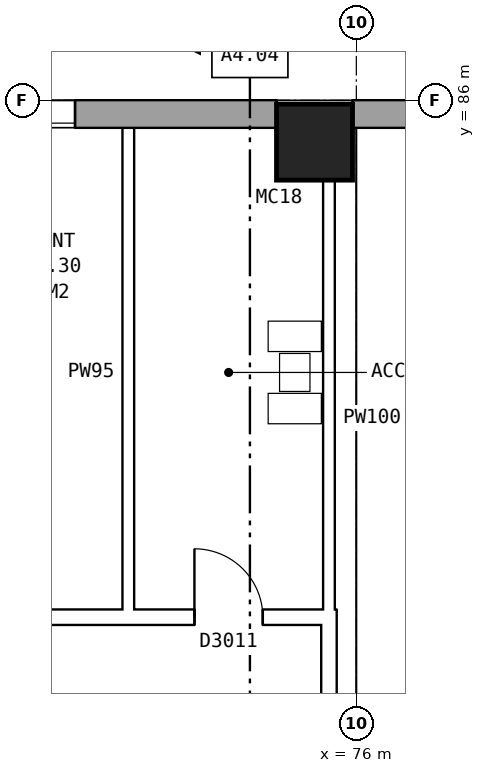
"""IFC4 building model, lengths in metres.
Left out: names, types, materials, properties, quantities, classifications, styles, units other than length and angle.
Written with IfcOpenShell. Run it as: python <this file> out.ifc"""

import sys

from ifc_helpers import new_model, si_unit, direction, frame, frame_2d, origin, origin_2d, place, context, subcontext, project, spatial, rectangle, hollow_rectangle, extrude, element, fill, save


model = new_model("IFC4")
c1 = context("Model", 3, precision=1e-05, world=origin(), true_north=direction((0.0, 1.0)))
c2 = subcontext(c1, "Body", "Model", "MODEL_VIEW")
j1 = project(units=[si_unit("LENGTHUNIT", "METRE"), si_unit("PLANEANGLEUNIT", "RADIAN")], contexts=[c1])
p1 = place(None, origin())
s1 = spatial("IfcSite", under=j1, at=p1, CompositionType="ELEMENT")
p2 = place(p1, origin())
s2 = spatial("IfcBuilding", under=s1, at=p2, CompositionType="ELEMENT")
p3 = place(p2, frame((0.0, 0.0, 215.2)))
s3 = spatial("IfcBuildingStorey", under=s2, at=p3, CompositionType="ELEMENT", Elevation=215.2)
p4 = place(p3, frame((75.45, 85.45, 0.0), z_axis=(0.0, 0.0, 1.0), x_axis=(1.0, 0.0, 0.0)))
e1 = element("IfcColumn", 1, at=p4, inside=s3, PredefinedType="COLUMN", context=c2, shape_type="SweptSolid", body=[
    extrude(hollow_rectangle(XDim=1.0, YDim=1.0, WallThickness=0.055, at=origin_2d()), origin(), (0.0, 0.0, 1.0), 6.2),
])
p5 = place(p3, frame((131.05, 85.82, 0.0), z_axis=(0.0, 0.0, 1.0), x_axis=(-1.0, 0.0, 0.0)))
e2 = element("IfcWall", 2, at=p5, inside=s3, PredefinedType="STANDARD", context=c2, shape_type="SweptSolid", body=[
    extrude(rectangle(XDim=55.1, YDim=0.36, at=frame_2d((27.55, 0.0))), origin(), (0.0, 0.0, 1.0), 5.6),
])
p6 = place(p5, frame((0.969, 0.0, 0.15)))
e3 = element("IfcOpeningElement", 3, at=p6, cuts=e2, PredefinedType="OPENING", context=c2, shape_type="SweptSolid", body=[
    extrude(rectangle(XDim=1.6, YDim=2.4, at=frame_2d((0.8, 1.2))), frame((0.0, 0.19, 0.0), z_axis=(0.0, -1.0, 0.0), x_axis=(1.0, 0.0, 0.0)), (0.0, 0.0, 1.0), 0.38),
])
p7 = place(p5, frame((4.406, 0.0, 0.15)))
e4 = element("IfcOpeningElement", 4, at=p7, cuts=e2, PredefinedType="OPENING", context=c2, shape_type="SweptSolid", body=[
    extrude(rectangle(XDim=1.6, YDim=2.4, at=frame_2d((0.8, 1.2))), frame((0.0, 0.19, 0.0), z_axis=(0.0, -1.0, 0.0), x_axis=(1.0, 0.0, 0.0)), (0.0, 0.0, 1.0), 0.38),
])
p8 = place(p5, frame((7.844, 0.0, 0.15)))
e5 = element("IfcOpeningElement", 5, at=p8, cuts=e2, PredefinedType="OPENING", context=c2, shape_type="SweptSolid", body=[
    extrude(rectangle(XDim=1.6, YDim=2.4, at=frame_2d((0.8, 1.2))), frame((0.0, 0.19, 0.0), z_axis=(0.0, -1.0, 0.0), x_axis=(1.0, 0.0, 0.0)), (0.0, 0.0, 1.0), 0.38),
])
p9 = place(p5, frame((11.281, 0.0, 0.15)))
e6 = element("IfcOpeningElement", 6, at=p9, cuts=e2, PredefinedType="OPENING", context=c2, shape_type="SweptSolid", body=[
    extrude(rectangle(XDim=1.6, YDim=2.4, at=frame_2d((0.8, 1.2))), frame((0.0, 0.19, 0.0), z_axis=(0.0, -1.0, 0.0), x_axis=(1.0, 0.0, 0.0)), (0.0, 0.0, 1.0), 0.38),
])
p10 = place(p5, frame((14.719, 0.0, 0.15)))
e7 = element("IfcOpeningElement", 7, at=p10, cuts=e2, PredefinedType="OPENING", context=c2, shape_type="SweptSolid", body=[
    extrude(rectangle(XDim=1.6, YDim=2.4, at=frame_2d((0.8, 1.2))), frame((0.0, 0.19, 0.0), z_axis=(0.0, -1.0, 0.0), x_axis=(1.0, 0.0, 0.0)), (0.0, 0.0, 1.0), 0.38),
])
p11 = place(p5, frame((18.156, 0.0, 0.15)))
e8 = element("IfcOpeningElement", 8, at=p11, cuts=e2, PredefinedType="OPENING", context=c2, shape_type="SweptSolid", body=[
    extrude(rectangle(XDim=1.6, YDim=2.4, at=frame_2d((0.8, 1.2))), frame((0.0, 0.19, 0.0), z_axis=(0.0, -1.0, 0.0), x_axis=(1.0, 0.0, 0.0)), (0.0, 0.0, 1.0), 0.38),
])
p12 = place(p5, frame((21.594, 0.0, 0.15)))
e9 = element("IfcOpeningElement", 9, at=p12, cuts=e2, PredefinedType="OPENING", context=c2, shape_type="SweptSolid", body=[
    extrude(rectangle(XDim=1.6, YDim=2.4, at=frame_2d((0.8, 1.2))), frame((0.0, 0.19, 0.0), z_axis=(0.0, -1.0, 0.0), x_axis=(1.0, 0.0, 0.0)), (0.0, 0.0, 1.0), 0.38),
])
p13 = place(p5, frame((25.031, 0.0, 0.15)))
e10 = element("IfcOpeningElement", 10, at=p13, cuts=e2, PredefinedType="OPENING", context=c2, shape_type="SweptSolid", body=[
    extrude(rectangle(XDim=1.6, YDim=2.4, at=frame_2d((0.8, 1.2))), frame((0.0, 0.19, 0.0), z_axis=(0.0, -1.0, 0.0), x_axis=(1.0, 0.0, 0.0)), (0.0, 0.0, 1.0), 0.38),
])
p14 = place(p5, frame((28.469, 0.0, 0.15)))
e11 = element("IfcOpeningElement", 11, at=p14, cuts=e2, PredefinedType="OPENING", context=c2, shape_type="SweptSolid", body=[
    extrude(rectangle(XDim=1.6, YDim=2.4, at=frame_2d((0.8, 1.2))), frame((0.0, 0.19, 0.0), z_axis=(0.0, -1.0, 0.0), x_axis=(1.0, 0.0, 0.0)), (0.0, 0.0, 1.0), 0.38),
])
p15 = place(p5, frame((31.906, 0.0, 0.15)))
e12 = element("IfcOpeningElement", 12, at=p15, cuts=e2, PredefinedType="OPENING", context=c2, shape_type="SweptSolid", body=[
    extrude(rectangle(XDim=1.6, YDim=2.4, at=frame_2d((0.8, 1.2))), frame((0.0, 0.19, 0.0), z_axis=(0.0, -1.0, 0.0), x_axis=(1.0, 0.0, 0.0)), (0.0, 0.0, 1.0), 0.38),
])
p16 = place(p5, frame((35.344, 0.0, 0.15)))
e13 = element("IfcOpeningElement", 13, at=p16, cuts=e2, PredefinedType="OPENING", context=c2, shape_type="SweptSolid", body=[
    extrude(rectangle(XDim=1.6, YDim=2.4, at=frame_2d((0.8, 1.2))), frame((0.0, 0.19, 0.0), z_axis=(0.0, -1.0, 0.0), x_axis=(1.0, 0.0, 0.0)), (0.0, 0.0, 1.0), 0.38),
])
p17 = place(p5, frame((38.781, 0.0, 0.15)))
e14 = element("IfcOpeningElement", 14, at=p17, cuts=e2, PredefinedType="OPENING", context=c2, shape_type="SweptSolid", body=[
    extrude(rectangle(XDim=1.6, YDim=2.4, at=frame_2d((0.8, 1.2))), frame((0.0, 0.19, 0.0), z_axis=(0.0, -1.0, 0.0), x_axis=(1.0, 0.0, 0.0)), (0.0, 0.0, 1.0), 0.38),
])
p18 = place(p5, frame((42.219, 0.0, 0.15)))
e15 = element("IfcOpeningElement", 15, at=p18, cuts=e2, PredefinedType="OPENING", context=c2, shape_type="SweptSolid", body=[
    extrude(rectangle(XDim=1.6, YDim=2.4, at=frame_2d((0.8, 1.2))), frame((0.0, 0.19, 0.0), z_axis=(0.0, -1.0, 0.0), x_axis=(1.0, 0.0, 0.0)), (0.0, 0.0, 1.0), 0.38),
])
p19 = place(p5, frame((45.656, 0.0, 0.15)))
e16 = element("IfcOpeningElement", 16, at=p19, cuts=e2, PredefinedType="OPENING", context=c2, shape_type="SweptSolid", body=[
    extrude(rectangle(XDim=1.6, YDim=2.4, at=frame_2d((0.8, 1.2))), frame((0.0, 0.19, 0.0), z_axis=(0.0, -1.0, 0.0), x_axis=(1.0, 0.0, 0.0)), (0.0, 0.0, 1.0), 0.38),
])
p20 = place(p5, frame((49.094, 0.0, 0.15)))
e17 = element("IfcOpeningElement", 17, at=p20, cuts=e2, PredefinedType="OPENING", context=c2, shape_type="SweptSolid", body=[
    extrude(rectangle(XDim=1.6, YDim=2.4, at=frame_2d((0.8, 1.2))), frame((0.0, 0.19, 0.0), z_axis=(0.0, -1.0, 0.0), x_axis=(1.0, 0.0, 0.0)), (0.0, 0.0, 1.0), 0.38),
])
p21 = place(p5, frame((52.531, 0.0, 0.15)))
e18 = element("IfcOpeningElement", 18, at=p21, cuts=e2, PredefinedType="OPENING", context=c2, shape_type="SweptSolid", body=[
    extrude(rectangle(XDim=1.6, YDim=2.4, at=frame_2d((0.8, 1.2))), frame((0.0, 0.19, 0.0), z_axis=(0.0, -1.0, 0.0), x_axis=(1.0, 0.0, 0.0)), (0.0, 0.0, 1.0), 0.38),
])
p22 = place(p3, frame((74.95, 85.82, 0.0), z_axis=(0.0, 0.0, 1.0), x_axis=(-1.0, 0.0, 0.0)))
e19 = element("IfcWall", 19, at=p22, inside=s3, PredefinedType="STANDARD", context=c2, shape_type="SweptSolid", body=[
    extrude(rectangle(XDim=39.875, YDim=0.36, at=frame_2d((19.938, 0.0))), origin(), (0.0, 0.0, 1.0), 5.6),
])
p23 = place(p22, frame((2.65, 0.0, 0.15)))
e20 = element("IfcOpeningElement", 20, at=p23, cuts=e19, PredefinedType="OPENING", context=c2, shape_type="SweptSolid", body=[
    extrude(rectangle(XDim=1.6, YDim=2.4, at=frame_2d((0.8, 1.2))), frame((0.0, 0.19, 0.0), z_axis=(0.0, -1.0, 0.0), x_axis=(1.0, 0.0, 0.0)), (0.0, 0.0, 1.0), 0.38),
])
p24 = place(p22, frame((5.125, 0.0, 0.15)))
e21 = element("IfcOpeningElement", 21, at=p24, cuts=e19, PredefinedType="OPENING", context=c2, shape_type="SweptSolid", body=[
    extrude(rectangle(XDim=1.6, YDim=2.4, at=frame_2d((0.8, 1.2))), frame((0.0, 0.19, 0.0), z_axis=(0.0, -1.0, 0.0), x_axis=(1.0, 0.0, 0.0)), (0.0, 0.0, 1.0), 0.38),
])
p25 = place(p22, frame((9.625, 0.0, 0.15)))
e22 = element("IfcOpeningElement", 22, at=p25, cuts=e19, PredefinedType="OPENING", context=c2, shape_type="SweptSolid", body=[
    extrude(rectangle(XDim=0.9, YDim=2.4, at=frame_2d((0.45, 1.2))), frame((0.0, 0.19, 0.0), z_axis=(0.0, -1.0, 0.0), x_axis=(1.0, 0.0, 0.0)), (0.0, 0.0, 1.0), 0.38),
])
p26 = place(p22, frame((11.65, 0.0, 0.15)))
e23 = element("IfcOpeningElement", 23, at=p26, cuts=e19, PredefinedType="OPENING", context=c2, shape_type="SweptSolid", body=[
    extrude(rectangle(XDim=1.6, YDim=2.4, at=frame_2d((0.8, 1.2))), frame((0.0, 0.19, 0.0), z_axis=(0.0, -1.0, 0.0), x_axis=(1.0, 0.0, 0.0)), (0.0, 0.0, 1.0), 0.38),
])
p27 = place(p22, frame((14.65, 0.0, 0.15)))
e24 = element("IfcOpeningElement", 24, at=p27, cuts=e19, PredefinedType="OPENING", context=c2, shape_type="SweptSolid", body=[
    extrude(rectangle(XDim=1.6, YDim=2.4, at=frame_2d((0.8, 1.2))), frame((0.0, 0.19, 0.0), z_axis=(0.0, -1.0, 0.0), x_axis=(1.0, 0.0, 0.0)), (0.0, 0.0, 1.0), 0.38),
])
p28 = place(p22, frame((17.65, 0.0, 0.15)))
e25 = element("IfcOpeningElement", 25, at=p28, cuts=e19, PredefinedType="OPENING", context=c2, shape_type="SweptSolid", body=[
    extrude(rectangle(XDim=1.6, YDim=2.4, at=frame_2d((0.8, 1.2))), frame((0.0, 0.19, 0.0), z_axis=(0.0, -1.0, 0.0), x_axis=(1.0, 0.0, 0.0)), (0.0, 0.0, 1.0), 0.38),
])
p29 = place(p22, frame((20.65, 0.0, 0.15)))
e26 = element("IfcOpeningElement", 26, at=p29, cuts=e19, PredefinedType="OPENING", context=c2, shape_type="SweptSolid", body=[
    extrude(rectangle(XDim=1.6, YDim=2.4, at=frame_2d((0.8, 1.2))), frame((0.0, 0.19, 0.0), z_axis=(0.0, -1.0, 0.0), x_axis=(1.0, 0.0, 0.0)), (0.0, 0.0, 1.0), 0.38),
])
p30 = place(p22, frame((23.65, 0.0, 0.15)))
e27 = element("IfcOpeningElement", 27, at=p30, cuts=e19, PredefinedType="OPENING", context=c2, shape_type="SweptSolid", body=[
    extrude(rectangle(XDim=1.6, YDim=2.4, at=frame_2d((0.8, 1.2))), frame((0.0, 0.19, 0.0), z_axis=(0.0, -1.0, 0.0), x_axis=(1.0, 0.0, 0.0)), (0.0, 0.0, 1.0), 0.38),
])
p31 = place(p22, frame((26.65, 0.0, 0.15)))
e28 = element("IfcOpeningElement", 28, at=p31, cuts=e19, PredefinedType="OPENING", context=c2, shape_type="SweptSolid", body=[
    extrude(rectangle(XDim=1.6, YDim=2.4, at=frame_2d((0.8, 1.2))), frame((0.0, 0.19, 0.0), z_axis=(0.0, -1.0, 0.0), x_axis=(1.0, 0.0, 0.0)), (0.0, 0.0, 1.0), 0.38),
])
p32 = place(p22, frame((29.65, 0.0, 0.15)))
e29 = element("IfcOpeningElement", 29, at=p32, cuts=e19, PredefinedType="OPENING", context=c2, shape_type="SweptSolid", body=[
    extrude(rectangle(XDim=1.6, YDim=2.4, at=frame_2d((0.8, 1.2))), frame((0.0, 0.19, 0.0), z_axis=(0.0, -1.0, 0.0), x_axis=(1.0, 0.0, 0.0)), (0.0, 0.0, 1.0), 0.38),
])
p33 = place(p22, frame((35.65, 0.0, 0.15)))
e30 = element("IfcOpeningElement", 30, at=p33, cuts=e19, PredefinedType="OPENING", context=c2, shape_type="SweptSolid", body=[
    extrude(rectangle(XDim=1.6, YDim=2.4, at=frame_2d((0.8, 1.2))), frame((0.0, 0.19, 0.0), z_axis=(0.0, -1.0, 0.0), x_axis=(1.0, 0.0, 0.0)), (0.0, 0.0, 1.0), 0.38),
])
p34 = place(p3, frame((32.24, 79.2, 0.0), z_axis=(0.0, 0.0, 1.0), x_axis=(1.0, 0.0, 0.0)))
e31 = element("IfcWall", 31, at=p34, inside=s3, PredefinedType="PARTITIONING", context=c2, shape_type="SweptSolid", body=[
    extrude(rectangle(XDim=43.5, YDim=0.2, at=frame_2d((21.75, 0.0))), origin(), (0.0, 0.0, 1.0), 5.6),
])
p35 = place(p34, frame((1.94, 0.0, 0.0)))
e32 = element("IfcOpeningElement", 32, at=p35, cuts=e31, PredefinedType="OPENING", context=c2, shape_type="SweptSolid", body=[
    extrude(rectangle(XDim=1.0, YDim=2.1, at=frame_2d((0.5, 1.05))), frame((0.0, 0.11, 0.0), z_axis=(0.0, -1.0, 0.0), x_axis=(1.0, 0.0, 0.0)), (0.0, 0.0, 1.0), 0.22),
])
p36 = place(p34, frame((8.46, 0.0, 0.0)))
e33 = element("IfcOpeningElement", 33, at=p36, cuts=e31, PredefinedType="OPENING", context=c2, shape_type="SweptSolid", body=[
    extrude(rectangle(XDim=1.0, YDim=2.1, at=frame_2d((0.5, 1.05))), frame((0.0, 0.11, 0.0), z_axis=(0.0, -1.0, 0.0), x_axis=(1.0, 0.0, 0.0)), (0.0, 0.0, 1.0), 0.22),
])
p37 = place(p34, frame((13.26, 0.0, 0.0)))
e34 = element("IfcOpeningElement", 34, at=p37, cuts=e31, PredefinedType="OPENING", context=c2, shape_type="SweptSolid", body=[
    extrude(rectangle(XDim=1.0, YDim=2.1, at=frame_2d((0.5, 1.05))), frame((0.0, 0.11, 0.0), z_axis=(0.0, -1.0, 0.0), x_axis=(1.0, 0.0, 0.0)), (0.0, 0.0, 1.0), 0.22),
])
p38 = place(p34, frame((20.76, 0.0, 0.0)))
e35 = element("IfcOpeningElement", 35, at=p38, cuts=e31, PredefinedType="OPENING", context=c2, shape_type="SweptSolid", body=[
    extrude(rectangle(XDim=1.0, YDim=2.1, at=frame_2d((0.5, 1.05))), frame((0.0, 0.11, 0.0), z_axis=(0.0, -1.0, 0.0), x_axis=(1.0, 0.0, 0.0)), (0.0, 0.0, 1.0), 0.22),
])
p39 = place(p34, frame((26.76, 0.0, 0.0)))
e36 = element("IfcOpeningElement", 36, at=p39, cuts=e31, PredefinedType="OPENING", context=c2, shape_type="SweptSolid", body=[
    extrude(rectangle(XDim=1.0, YDim=2.1, at=frame_2d((0.5, 1.05))), frame((0.0, 0.11, 0.0), z_axis=(0.0, -1.0, 0.0), x_axis=(1.0, 0.0, 0.0)), (0.0, 0.0, 1.0), 0.22),
])
p40 = place(p34, frame((29.76, 0.0, 0.0)))
e37 = element("IfcOpeningElement", 37, at=p40, cuts=e31, PredefinedType="OPENING", context=c2, shape_type="SweptSolid", body=[
    extrude(rectangle(XDim=1.0, YDim=2.1, at=frame_2d((0.5, 1.05))), frame((0.0, 0.11, 0.0), z_axis=(0.0, -1.0, 0.0), x_axis=(1.0, 0.0, 0.0)), (0.0, 0.0, 1.0), 0.22),
])
p41 = place(p34, frame((32.81, 0.0, 0.0)))
e38 = element("IfcOpeningElement", 38, at=p41, cuts=e31, PredefinedType="OPENING", context=c2, shape_type="SweptSolid", body=[
    extrude(rectangle(XDim=0.9, YDim=2.1, at=frame_2d((0.45, 1.05))), frame((0.0, 0.11, 0.0), z_axis=(0.0, -1.0, 0.0), x_axis=(1.0, 0.0, 0.0)), (0.0, 0.0, 1.0), 0.22),
])
p42 = place(p34, frame((35.81, 0.0, 0.0)))
e39 = element("IfcOpeningElement", 39, at=p42, cuts=e31, PredefinedType="OPENING", context=c2, shape_type="SweptSolid", body=[
    extrude(rectangle(XDim=0.9, YDim=2.1, at=frame_2d((0.45, 1.05))), frame((0.0, 0.11, 0.0), z_axis=(0.0, -1.0, 0.0), x_axis=(1.0, 0.0, 0.0)), (0.0, 0.0, 1.0), 0.22),
])
p43 = place(p34, frame((38.81, 0.0, 0.0)))
e40 = element("IfcOpeningElement", 40, at=p43, cuts=e31, PredefinedType="OPENING", context=c2, shape_type="SweptSolid", body=[
    extrude(rectangle(XDim=0.9, YDim=2.1, at=frame_2d((0.45, 1.05))), frame((0.0, 0.11, 0.0), z_axis=(0.0, -1.0, 0.0), x_axis=(1.0, 0.0, 0.0)), (0.0, 0.0, 1.0), 0.22),
])
p44 = place(p34, frame((41.63, 0.0, 0.0)))
e41 = element("IfcOpeningElement", 41, at=p44, cuts=e31, PredefinedType="OPENING", context=c2, shape_type="SweptSolid", body=[
    extrude(rectangle(XDim=0.9, YDim=2.1, at=frame_2d((0.45, 1.05))), frame((0.0, 0.11, 0.0), z_axis=(0.0, -1.0, 0.0), x_axis=(1.0, 0.0, 0.0)), (0.0, 0.0, 1.0), 0.22),
])
p45 = place(p3, frame((73.0, 79.1, 0.0), z_axis=(0.0, 0.0, 1.0), x_axis=(0.0, 1.0, 0.0)))
e42 = element("IfcWall", 42, at=p45, inside=s3, PredefinedType="PLUMBINGWALL", context=c2, shape_type="SweptSolid", body=[
    extrude(rectangle(XDim=6.66, YDim=0.15, at=frame_2d((3.33, 0.0))), origin(), (0.0, 0.0, 1.0), 5.6),
])
p46 = place(p3, frame((75.64, 76.2, 0.0), z_axis=(0.0, 0.0, 1.0), x_axis=(0.0, 1.0, 0.0)))
e43 = element("IfcWall", 43, at=p46, inside=s3, PredefinedType="PARTITIONING", context=c2, shape_type="SweptSolid", body=[
    extrude(rectangle(XDim=3.1, YDim=0.2, at=frame_2d((1.55, 0.0))), origin(), (0.0, 0.0, 1.0), 5.6),
])
p47 = place(p3, frame((75.64, 79.1, 0.0), z_axis=(0.0, 0.0, 1.0), x_axis=(0.0, 1.0, 0.0)))
e44 = element("IfcWall", 44, at=p47, inside=s3, PredefinedType="PLUMBINGWALL", context=c2, shape_type="SweptSolid", body=[
    extrude(rectangle(XDim=6.66, YDim=0.15, at=frame_2d((3.33, 0.0))), origin(), (0.0, 0.0, 1.0), 5.6),
])
p48 = place(p23, origin())
e45 = element("IfcWindow", 45, at=p48, inside=s3, PartitioningType="SINGLE_PANEL", PredefinedType="WINDOW", context=c2, shape_type="SweptSolid", body=[
    extrude(rectangle(XDim=1.6, YDim=2.4, at=frame_2d((0.8, 1.2))), frame((0.0, 0.15, 0.0), z_axis=(0.0, -1.0, 0.0), x_axis=(1.0, 0.0, 0.0)), (0.0, 0.0, 1.0), 0.06),
])
fill(e20, e45)
p49 = place(p44, origin())
e46 = element("IfcDoor", 46, at=p49, inside=s3, OperationType="SINGLE_SWING_LEFT", PredefinedType="DOOR", context=c2, shape_type="SweptSolid", body=[
    extrude(rectangle(XDim=0.9, YDim=2.1, at=frame_2d((0.45, 1.05))), frame((0.0, 0.025, 0.0), z_axis=(0.0, -1.0, 0.0), x_axis=(1.0, 0.0, 0.0)), (0.0, 0.0, 1.0), 0.05),
])
fill(e41, e46)
save(model, sys.argv[1])
